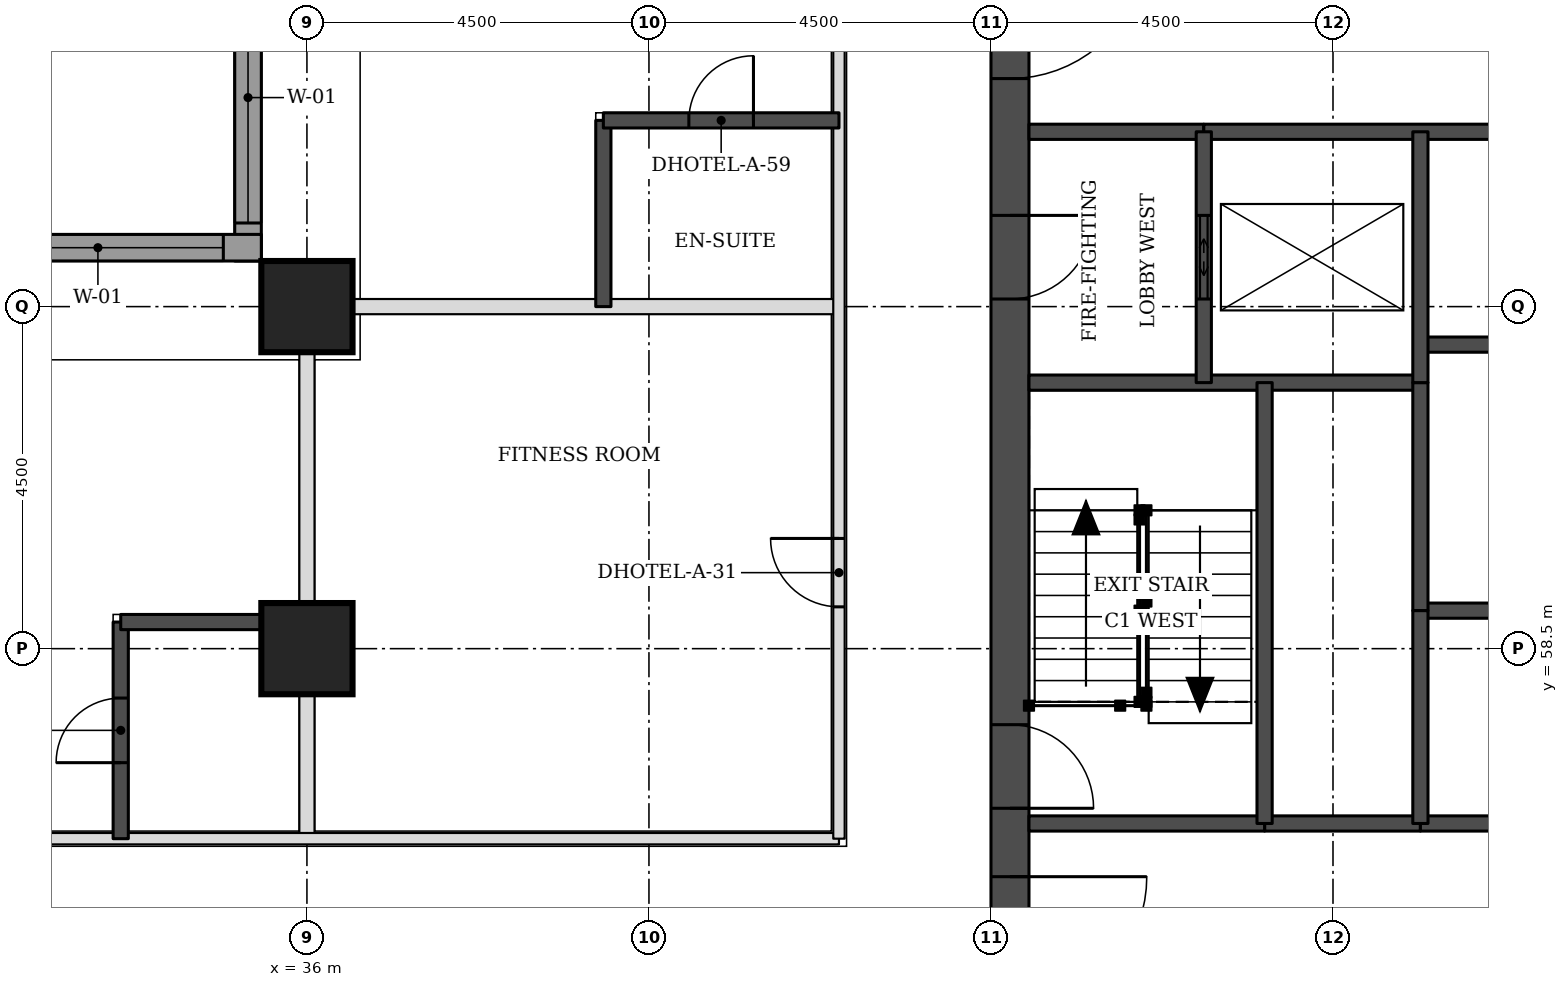
"""IFC4 building model, lengths in metres.
Left out: names, types, materials, properties, quantities, classifications, styles, units other than length and angle.
Written with IfcOpenShell. Run it as: python <this file> out.ifc"""

import sys

from ifc_helpers import new_model, si_unit, direction, frame, frame_2d, origin, origin_2d, place, context, subcontext, project, spatial, rectangle, extrude, element, fill, save


model = new_model("IFC4")
c1 = context("Model", 3, precision=1e-05, world=origin(), true_north=direction((0.0, 1.0)))
c2 = subcontext(c1, "Body", "Model", "MODEL_VIEW")
j1 = project(units=[si_unit("LENGTHUNIT", "METRE"), si_unit("PLANEANGLEUNIT", "RADIAN")], contexts=[c1])
p1 = place(None, origin())
s1 = spatial("IfcSite", under=j1, at=p1, CompositionType="ELEMENT")
p2 = place(p1, origin())
s2 = spatial("IfcBuilding", under=s1, at=p2, CompositionType="ELEMENT")
p3 = place(p2, frame((0.0, 0.0, 26.4)))
s3 = spatial("IfcBuildingStorey", under=s2, at=p3, CompositionType="ELEMENT", Elevation=26.4)
for number, where, z_axis, x_axis in (
    (1, (36.0, 58.5, 0.0), (0.0, 0.0, 1.0), (1.0, 0.0, 0.0)),
    (2, (36.0, 63.0, 0.0), (0.0, 0.0, 1.0), (1.0, 0.0, 0.0)),
):
    element("IfcColumn", number, at=place(p3, frame(where, z_axis=z_axis, x_axis=x_axis)), inside=s3, PredefinedType="COLUMN", context=c2, shape_type="SweptSolid", body=[
        extrude(rectangle(XDim=1.2, YDim=1.2, at=origin_2d()), origin(), (0.0, 0.0, 1.0), 3.3),
    ])
p4 = place(p3, frame((45.25, 49.5, 0.0), z_axis=(0.0, 0.0, 1.0), x_axis=(0.0, 1.0, 0.0)))
e3 = element("IfcWall", 3, at=p4, inside=s3, PredefinedType="SHEAR", context=c2, shape_type="SweptSolid", body=[
    extrude(rectangle(XDim=22.5, YDim=0.5, at=frame_2d((11.25, 0.0))), origin(), (0.0, 0.0, 1.0), 3.3),
])
p5 = place(p4, frame((4.2, 0.0, 0.0)))
e4 = element("IfcOpeningElement", 4, at=p5, cuts=e3, PredefinedType="OPENING", context=c2, shape_type="SweptSolid", body=[
    extrude(rectangle(XDim=1.8, YDim=2.1, at=frame_2d((0.9, 1.05))), frame((0.0, 0.26, 0.0), z_axis=(0.0, -1.0, 0.0), x_axis=(1.0, 0.0, 0.0)), (0.0, 0.0, 1.0), 0.52),
])
p6 = place(p4, frame((6.9, 0.0, 0.0)))
e5 = element("IfcOpeningElement", 5, at=p6, cuts=e3, PredefinedType="OPENING", context=c2, shape_type="SweptSolid", body=[
    extrude(rectangle(XDim=1.1, YDim=2.1, at=frame_2d((0.55, 1.05))), frame((0.0, 0.26, 0.0), z_axis=(0.0, -1.0, 0.0), x_axis=(1.0, 0.0, 0.0)), (0.0, 0.0, 1.0), 0.52),
])
p7 = place(p4, frame((13.6, 0.0, 0.0)))
e6 = element("IfcOpeningElement", 6, at=p7, cuts=e3, PredefinedType="OPENING", context=c2, shape_type="SweptSolid", body=[
    extrude(rectangle(XDim=1.1, YDim=2.1, at=frame_2d((0.55, 1.05))), frame((0.0, 0.26, 0.0), z_axis=(0.0, -1.0, 0.0), x_axis=(1.0, 0.0, 0.0)), (0.0, 0.0, 1.0), 0.52),
])
p8 = place(p4, frame((16.5, 0.0, 0.0)))
e7 = element("IfcOpeningElement", 7, at=p8, cuts=e3, PredefinedType="OPENING", context=c2, shape_type="SweptSolid", body=[
    extrude(rectangle(XDim=1.8, YDim=2.1, at=frame_2d((0.9, 1.05))), frame((0.0, 0.26, 0.0), z_axis=(0.0, -1.0, 0.0), x_axis=(1.0, 0.0, 0.0)), (0.0, 0.0, 1.0), 0.52),
])
p9 = place(p3, frame((35.225, 76.894, 0.0), z_axis=(0.0, 0.0, 1.0), x_axis=(0.0, -1.0, 0.0)))
e8 = element("IfcWall", 8, at=p9, inside=s3, PredefinedType="STANDARD", context=c2, shape_type="SweptSolid", body=[
    extrude(rectangle(XDim=13.293, YDim=0.35, at=frame_2d((6.647, 0.0))), origin(), (0.0, 0.0, 1.0), 3.055),
])
p10 = place(p9, frame((9.493, 0.0, 0.8)))
e9 = element("IfcOpeningElement", 9, at=p10, cuts=e8, PredefinedType="OPENING", context=c2, shape_type="SweptSolid", body=[
    extrude(rectangle(XDim=3.3, YDim=1.5, at=frame_2d((1.65, 0.75))), frame((0.0, 0.185, 0.0), z_axis=(0.0, -1.0, 0.0), x_axis=(1.0, 0.0, 0.0)), (0.0, 0.0, 1.0), 0.37),
])
p11 = place(p3, frame((35.4, 63.775, 0.0), z_axis=(0.0, 0.0, 1.0), x_axis=(-1.0, 0.0, 0.0)))
e10 = element("IfcWall", 10, at=p11, inside=s3, PredefinedType="STANDARD", context=c2, shape_type="SweptSolid", body=[
    extrude(rectangle(XDim=17.793, YDim=0.35, at=frame_2d((8.897, 0.0))), origin(), (0.0, 0.0, 1.0), 3.055),
])
p12 = place(p11, frame((0.5, 0.0, 0.8)))
e11 = element("IfcOpeningElement", 11, at=p12, cuts=e10, PredefinedType="OPENING", context=c2, shape_type="SweptSolid", body=[
    extrude(rectangle(XDim=3.3, YDim=1.5, at=frame_2d((1.65, 0.75))), frame((0.0, 0.185, 0.0), z_axis=(0.0, -1.0, 0.0), x_axis=(1.0, 0.0, 0.0)), (0.0, 0.0, 1.0), 0.37),
])
p13 = place(p11, frame((9.0, 0.0, 0.8)))
e12 = element("IfcOpeningElement", 12, at=p13, cuts=e10, PredefinedType="OPENING", context=c2, shape_type="SweptSolid", body=[
    extrude(rectangle(XDim=3.3, YDim=1.5, at=frame_2d((1.65, 0.75))), frame((0.0, 0.185, 0.0), z_axis=(0.0, -1.0, 0.0), x_axis=(1.0, 0.0, 0.0)), (0.0, 0.0, 1.0), 0.37),
])
p14 = place(p3, frame((36.0, 56.0, 0.0), z_axis=(0.0, 0.0, 1.0), x_axis=(0.0, 1.0, 0.0)))
e13 = element("IfcWall", 13, at=p14, inside=s3, PredefinedType="PARTITIONING", context=c2, shape_type="SweptSolid", body=[
    extrude(rectangle(XDim=6.4, YDim=0.2, at=frame_2d((3.2, 0.0))), origin(), (0.0, 0.0, 1.0), 2.33),
])
p15 = place(p3, frame((36.6, 63.0, 0.0), z_axis=(0.0, 0.0, 1.0), x_axis=(1.0, 0.0, 0.0)))
e14 = element("IfcWall", 14, at=p15, inside=s3, PredefinedType="PARTITIONING", context=c2, shape_type="SweptSolid", body=[
    extrude(rectangle(XDim=6.4, YDim=0.2, at=frame_2d((3.2, 0.0))), origin(), (0.0, 0.0, 1.0), 3.08),
])
p16 = place(p3, frame((27.0, 56.0, 0.0), z_axis=(0.0, 0.0, 1.0), x_axis=(1.0, 0.0, 0.0)))
e15 = element("IfcWall", 15, at=p16, inside=s3, PredefinedType="PARTITIONING", context=c2, shape_type="SweptSolid", body=[
    extrude(rectangle(XDim=16.0, YDim=0.15, at=frame_2d((8.0, 0.0))), origin(), (0.0, 0.0, 1.0), 3.08),
])
p17 = place(p16, frame((2.775, 0.0, 0.0)))
e16 = element("IfcOpeningElement", 16, at=p17, cuts=e15, PredefinedType="OPENING", context=c2, shape_type="SweptSolid", body=[
    extrude(rectangle(XDim=1.0, YDim=2.1, at=frame_2d((0.5, 1.05))), frame((0.0, 0.085, 0.0), z_axis=(0.0, -1.0, 0.0), x_axis=(1.0, 0.0, 0.0)), (0.0, 0.0, 1.0), 0.17),
])
p18 = place(p3, frame((43.0, 56.0, 0.0), z_axis=(0.0, 0.0, 1.0), x_axis=(0.0, 1.0, 0.0)))
e17 = element("IfcWall", 17, at=p18, inside=s3, PredefinedType="PARTITIONING", context=c2, shape_type="SweptSolid", body=[
    extrude(rectangle(XDim=18.0, YDim=0.15, at=frame_2d((9.0, 0.0))), origin(), (0.0, 0.0, 1.0), 3.08),
])
p19 = place(p18, frame((12.225, 0.0, 0.0)))
e18 = element("IfcOpeningElement", 18, at=p19, cuts=e17, PredefinedType="OPENING", context=c2, shape_type="SweptSolid", body=[
    extrude(rectangle(XDim=1.0, YDim=2.1, at=frame_2d((0.5, 1.05))), frame((0.0, 0.085, 0.0), z_axis=(0.0, -1.0, 0.0), x_axis=(1.0, 0.0, 0.0)), (0.0, 0.0, 1.0), 0.17),
])
p20 = place(p18, frame((16.553, 0.0, 0.0)))
e19 = element("IfcOpeningElement", 19, at=p20, cuts=e17, PredefinedType="OPENING", context=c2, shape_type="SweptSolid", body=[
    extrude(rectangle(XDim=1.0, YDim=2.1, at=frame_2d((0.5, 1.05))), frame((0.0, 0.085, 0.0), z_axis=(0.0, -1.0, 0.0), x_axis=(1.0, 0.0, 0.0)), (0.0, 0.0, 1.0), 0.17),
])
p21 = place(p18, frame((3.05, 0.0, 0.0)))
e20 = element("IfcOpeningElement", 20, at=p21, cuts=e17, PredefinedType="OPENING", context=c2, shape_type="SweptSolid", body=[
    extrude(rectangle(XDim=0.9, YDim=2.1, at=frame_2d((0.45, 1.05))), frame((0.0, 0.085, 0.0), z_axis=(0.0, -1.0, 0.0), x_axis=(1.0, 0.0, 0.0)), (0.0, 0.0, 1.0), 0.17),
])
p22 = place(p3, frame((33.55, 56.0, 0.0), z_axis=(0.0, 0.0, 1.0), x_axis=(0.0, 1.0, 0.0)))
e21 = element("IfcWall", 21, at=p22, inside=s3, PredefinedType="SOLIDWALL", context=c2, shape_type="SweptSolid", body=[
    extrude(rectangle(XDim=2.85, YDim=0.2, at=frame_2d((1.425, 0.0))), origin(), (0.0, 0.0, 1.0), 3.08),
])
p23 = place(p22, frame((1.0, 0.0, 0.0)))
e22 = element("IfcOpeningElement", 22, at=p23, cuts=e21, PredefinedType="OPENING", context=c2, shape_type="SweptSolid", body=[
    extrude(rectangle(XDim=0.85, YDim=2.1, at=frame_2d((0.425, 1.05))), frame((0.0, 0.11, 0.0), z_axis=(0.0, -1.0, 0.0), x_axis=(1.0, 0.0, 0.0)), (0.0, 0.0, 1.0), 0.22),
])
for number, where, z_axis, x_axis in (
    (23, (33.55, 58.85, 0.0), (0.0, 0.0, 1.0), (1.0, 0.0, 0.0)),
    (24, (39.9, 63.0, 0.0), (0.0, 0.0, 1.0), (0.0, 1.0, 0.0)),
):
    element("IfcWall", number, at=place(p3, frame(where, z_axis=z_axis, x_axis=x_axis)), inside=s3, PredefinedType="SOLIDWALL", context=c2, shape_type="SweptSolid", body=[
        extrude(rectangle(XDim=2.45, YDim=0.2, at=frame_2d((1.225, 0.0))), origin(), (0.0, 0.0, 1.0), 3.08),
    ])
p24 = place(p3, frame((39.9, 65.45, 0.0), z_axis=(0.0, 0.0, 1.0), x_axis=(1.0, 0.0, 0.0)))
e25 = element("IfcWall", 25, at=p24, inside=s3, PredefinedType="SOLIDWALL", context=c2, shape_type="SweptSolid", body=[
    extrude(rectangle(XDim=3.1, YDim=0.2, at=frame_2d((1.55, 0.0))), origin(), (0.0, 0.0, 1.0), 3.08),
])
p25 = place(p24, frame((1.125, 0.0, 0.0)))
e26 = element("IfcOpeningElement", 26, at=p25, cuts=e25, PredefinedType="OPENING", context=c2, shape_type="SweptSolid", body=[
    extrude(rectangle(XDim=0.85, YDim=2.1, at=frame_2d((0.425, 1.05))), frame((0.0, 0.11, 0.0), z_axis=(0.0, -1.0, 0.0), x_axis=(1.0, 0.0, 0.0)), (0.0, 0.0, 1.0), 0.22),
])
p26 = place(p3, frame((48.6, 56.2, 0.0), z_axis=(0.0, 0.0, 1.0), x_axis=(1.0, 0.0, 0.0)))
e27 = element("IfcWall", 27, at=p26, inside=s3, PredefinedType="SOLIDWALL", context=c2, shape_type="SweptSolid", body=[
    extrude(rectangle(XDim=2.05, YDim=0.2, at=frame_2d((1.025, 0.0))), origin(), (0.0, 0.0, 1.0), 3.08),
])
p27 = place(p3, frame((45.5, 56.2, 0.0), z_axis=(0.0, 0.0, 1.0), x_axis=(1.0, 0.0, 0.0)))
e28 = element("IfcWall", 28, at=p27, inside=s3, PredefinedType="SOLIDWALL", context=c2, shape_type="SweptSolid", body=[
    extrude(rectangle(XDim=3.1, YDim=0.2, at=frame_2d((1.55, 0.0))), origin(), (0.0, 0.0, 1.0), 3.08),
])
p28 = place(p3, frame((50.65, 56.2, 0.0), z_axis=(0.0, 0.0, 1.0), x_axis=(1.0, 0.0, 0.0)))
e29 = element("IfcWall", 29, at=p28, inside=s3, PredefinedType="SOLIDWALL", context=c2, shape_type="SweptSolid", body=[
    extrude(rectangle(XDim=11.2, YDim=0.2, at=frame_2d((5.6, 0.0))), origin(), (0.0, 0.0, 1.0), 3.08),
])
p29 = place(p3, frame((50.65, 59.0, 0.0), z_axis=(0.0, 0.0, 1.0), x_axis=(1.0, 0.0, 0.0)))
e30 = element("IfcWall", 30, at=p29, inside=s3, PredefinedType="SOLIDWALL", context=c2, shape_type="SweptSolid", body=[
    extrude(rectangle(XDim=11.2, YDim=0.2, at=frame_2d((5.6, 0.0))), origin(), (0.0, 0.0, 1.0), 3.3),
])
p30 = place(p3, frame((45.5, 62.0, 0.0), z_axis=(0.0, 0.0, 1.0), x_axis=(1.0, 0.0, 0.0)))
e31 = element("IfcWall", 31, at=p30, inside=s3, PredefinedType="SOLIDWALL", context=c2, shape_type="SweptSolid", body=[
    extrude(rectangle(XDim=5.15, YDim=0.2, at=frame_2d((2.575, 0.0))), origin(), (0.0, 0.0, 1.0), 3.08),
])
p31 = place(p3, frame((50.65, 62.5, 0.0), z_axis=(0.0, 0.0, 1.0), x_axis=(1.0, 0.0, 0.0)))
e32 = element("IfcWall", 32, at=p31, inside=s3, PredefinedType="SOLIDWALL", context=c2, shape_type="SweptSolid", body=[
    extrude(rectangle(XDim=11.2, YDim=0.2, at=frame_2d((5.6, 0.0))), origin(), (0.0, 0.0, 1.0), 3.3),
])
p32 = place(p3, frame((45.5, 65.3, 0.0), z_axis=(0.0, 0.0, 1.0), x_axis=(1.0, 0.0, 0.0)))
e33 = element("IfcWall", 33, at=p32, inside=s3, PredefinedType="SOLIDWALL", context=c2, shape_type="SweptSolid", body=[
    extrude(rectangle(XDim=2.3, YDim=0.2, at=frame_2d((1.15, 0.0))), origin(), (0.0, 0.0, 1.0), 3.08),
])
p33 = place(p3, frame((47.8, 65.3, 0.0), z_axis=(0.0, 0.0, 1.0), x_axis=(1.0, 0.0, 0.0)))
e34 = element("IfcWall", 34, at=p33, inside=s3, PredefinedType="SOLIDWALL", context=c2, shape_type="SweptSolid", body=[
    extrude(rectangle(XDim=16.9, YDim=0.2, at=frame_2d((8.45, 0.0))), origin(), (0.0, 0.0, 1.0), 3.08),
])
p34 = place(p3, frame((47.8, 62.0, 0.0), z_axis=(0.0, 0.0, 1.0), x_axis=(0.0, 1.0, 0.0)))
e35 = element("IfcWall", 35, at=p34, inside=s3, PredefinedType="SOLIDWALL", context=c2, shape_type="SweptSolid", body=[
    extrude(rectangle(XDim=3.3, YDim=0.2, at=frame_2d((1.65, 0.0))), origin(), (0.0, 0.0, 1.0), 3.08),
])
p35 = place(p34, frame((1.1, 0.0, 0.0)))
e36 = element("IfcOpeningElement", 36, at=p35, cuts=e35, PredefinedType="OPENING", context=c2, shape_type="SweptSolid", body=[
    extrude(rectangle(XDim=1.1, YDim=2.1, at=frame_2d((0.55, 1.05))), frame((0.0, 0.11, 0.0), z_axis=(0.0, -1.0, 0.0), x_axis=(1.0, 0.0, 0.0)), (0.0, 0.0, 1.0), 0.22),
])
p36 = place(p3, frame((48.6, 56.2, 0.0), z_axis=(0.0, 0.0, 1.0), x_axis=(0.0, 1.0, 0.0)))
e37 = element("IfcWall", 37, at=p36, inside=s3, PredefinedType="SOLIDWALL", context=c2, shape_type="SweptSolid", body=[
    extrude(rectangle(XDim=5.8, YDim=0.2, at=frame_2d((2.9, 0.0))), origin(), (0.0, 0.0, 1.0), 3.08),
])
p37 = place(p3, frame((50.65, 59.0, 0.0), z_axis=(0.0, 0.0, 1.0), x_axis=(0.0, 1.0, 0.0)))
e38 = element("IfcWall", 38, at=p37, inside=s3, PredefinedType="SOLIDWALL", context=c2, shape_type="SweptSolid", body=[
    extrude(rectangle(XDim=3.0, YDim=0.2, at=frame_2d((1.5, 0.0))), origin(), (0.0, 0.0, 1.0), 3.3),
])
p38 = place(p3, frame((50.65, 56.2, 0.0), z_axis=(0.0, 0.0, 1.0), x_axis=(0.0, 1.0, 0.0)))
e39 = element("IfcWall", 39, at=p38, inside=s3, PredefinedType="SOLIDWALL", context=c2, shape_type="SweptSolid", body=[
    extrude(rectangle(XDim=2.8, YDim=0.2, at=frame_2d((1.4, 0.0))), origin(), (0.0, 0.0, 1.0), 3.08),
])
p39 = place(p3, frame((50.65, 62.0, 0.0), z_axis=(0.0, 0.0, 1.0), x_axis=(0.0, 1.0, 0.0)))
e40 = element("IfcWall", 40, at=p39, inside=s3, PredefinedType="SOLIDWALL", context=c2, shape_type="SweptSolid", body=[
    extrude(rectangle(XDim=3.3, YDim=0.2, at=frame_2d((1.65, 0.0))), origin(), (0.0, 0.0, 1.0), 3.08),
])
p40 = place(p10, origin())
e41 = element("IfcWindow", 41, at=p40, inside=s3, PartitioningType="SINGLE_PANEL", PredefinedType="WINDOW", context=c2, shape_type="SweptSolid", body=[
    extrude(rectangle(XDim=3.3, YDim=1.5, at=frame_2d((1.65, 0.75))), frame((0.0, 0.085, 0.0), z_axis=(0.0, -1.0, 0.0), x_axis=(1.0, 0.0, 0.0)), (0.0, 0.0, 1.0), 0.06),
])
fill(e9, e41)
p41 = place(p12, origin())
e42 = element("IfcWindow", 42, at=p41, inside=s3, PartitioningType="SINGLE_PANEL", PredefinedType="WINDOW", context=c2, shape_type="SweptSolid", body=[
    extrude(rectangle(XDim=3.3, YDim=1.5, at=frame_2d((1.65, 0.75))), frame((0.0, 0.085, 0.0), z_axis=(0.0, -1.0, 0.0), x_axis=(1.0, 0.0, 0.0)), (0.0, 0.0, 1.0), 0.06),
])
fill(e11, e42)
p42 = place(p23, origin())
e43 = element("IfcDoor", 43, at=p42, inside=s3, OperationType="SINGLE_SWING_LEFT", PredefinedType="DOOR", context=c2, shape_type="SweptSolid", body=[
    extrude(rectangle(XDim=0.85, YDim=2.1, at=frame_2d((0.425, 1.05))), frame((0.0, 0.025, 0.0), z_axis=(0.0, -1.0, 0.0), x_axis=(1.0, 0.0, 0.0)), (0.0, 0.0, 1.0), 0.05),
])
fill(e22, e43)
p43 = place(p25, origin())
e44 = element("IfcDoor", 44, at=p43, inside=s3, OperationType="SINGLE_SWING_RIGHT", PredefinedType="DOOR", context=c2, shape_type="SweptSolid", body=[
    extrude(rectangle(XDim=0.85, YDim=2.1, at=frame_2d((0.425, 1.05))), frame((0.0, 0.025, 0.0), z_axis=(0.0, -1.0, 0.0), x_axis=(1.0, 0.0, 0.0)), (0.0, 0.0, 1.0), 0.05),
])
fill(e26, e44)
p44 = place(p21, origin())
e45 = element("IfcDoor", 45, at=p44, inside=s3, OperationType="SINGLE_SWING_RIGHT", PredefinedType="DOOR", context=c2, shape_type="SweptSolid", body=[
    extrude(rectangle(XDim=0.9, YDim=2.1, at=frame_2d((0.45, 1.05))), frame((0.0, 0.025, 0.0), z_axis=(0.0, -1.0, 0.0), x_axis=(1.0, 0.0, 0.0)), (0.0, 0.0, 1.0), 0.05),
])
fill(e20, e45)
p45 = place(p35, origin())
e46 = element("IfcDoor", 46, at=p45, inside=s3, OperationType="DOUBLE_DOOR_SLIDING", PredefinedType="DOOR", context=c2, shape_type="SweptSolid", body=[
    extrude(rectangle(XDim=1.1, YDim=2.1, at=frame_2d((0.55, 1.05))), frame((0.0, 0.025, 0.0), z_axis=(0.0, -1.0, 0.0), x_axis=(1.0, 0.0, 0.0)), (0.0, 0.0, 1.0), 0.05),
])
fill(e36, e46)
p46 = place(p5, frame((1.8, 0.0, 0.0), z_axis=(0.0, 0.0, 1.0), x_axis=(-1.0, 0.0, 0.0)))
e47 = element("IfcDoor", 47, at=p46, inside=s3, OperationType="SINGLE_SWING_LEFT", PredefinedType="DOOR", context=c2, shape_type="SweptSolid", body=[
    extrude(rectangle(XDim=1.8, YDim=2.1, at=frame_2d((0.9, 1.05))), frame((0.0, 0.025, 0.0), z_axis=(0.0, -1.0, 0.0), x_axis=(1.0, 0.0, 0.0)), (0.0, 0.0, 1.0), 0.05),
])
fill(e4, e47)
p47 = place(p6, frame((1.1, 0.0, 0.0), z_axis=(0.0, 0.0, 1.0), x_axis=(-1.0, 0.0, 0.0)))
e48 = element("IfcDoor", 48, at=p47, inside=s3, OperationType="SINGLE_SWING_RIGHT", PredefinedType="DOOR", context=c2, shape_type="SweptSolid", body=[
    extrude(rectangle(XDim=1.1, YDim=2.1, at=frame_2d((0.55, 1.05))), frame((0.0, 0.025, 0.0), z_axis=(0.0, -1.0, 0.0), x_axis=(1.0, 0.0, 0.0)), (0.0, 0.0, 1.0), 0.05),
])
fill(e5, e48)
p48 = place(p7, frame((1.1, 0.0, 0.0), z_axis=(0.0, 0.0, 1.0), x_axis=(-1.0, 0.0, 0.0)))
e49 = element("IfcDoor", 49, at=p48, inside=s3, OperationType="SINGLE_SWING_LEFT", PredefinedType="DOOR", context=c2, shape_type="SweptSolid", body=[
    extrude(rectangle(XDim=1.1, YDim=2.1, at=frame_2d((0.55, 1.05))), frame((0.0, 0.025, 0.0), z_axis=(0.0, -1.0, 0.0), x_axis=(1.0, 0.0, 0.0)), (0.0, 0.0, 1.0), 0.05),
])
fill(e6, e49)
p49 = place(p8, frame((1.8, 0.0, 0.0), z_axis=(0.0, 0.0, 1.0), x_axis=(-1.0, 0.0, 0.0)))
e50 = element("IfcDoor", 50, at=p49, inside=s3, OperationType="SINGLE_SWING_LEFT", PredefinedType="DOOR", context=c2, shape_type="SweptSolid", body=[
    extrude(rectangle(XDim=1.8, YDim=2.1, at=frame_2d((0.9, 1.05))), frame((0.0, 0.025, 0.0), z_axis=(0.0, -1.0, 0.0), x_axis=(1.0, 0.0, 0.0)), (0.0, 0.0, 1.0), 0.05),
])
fill(e7, e50)
save(model, sys.argv[1])
